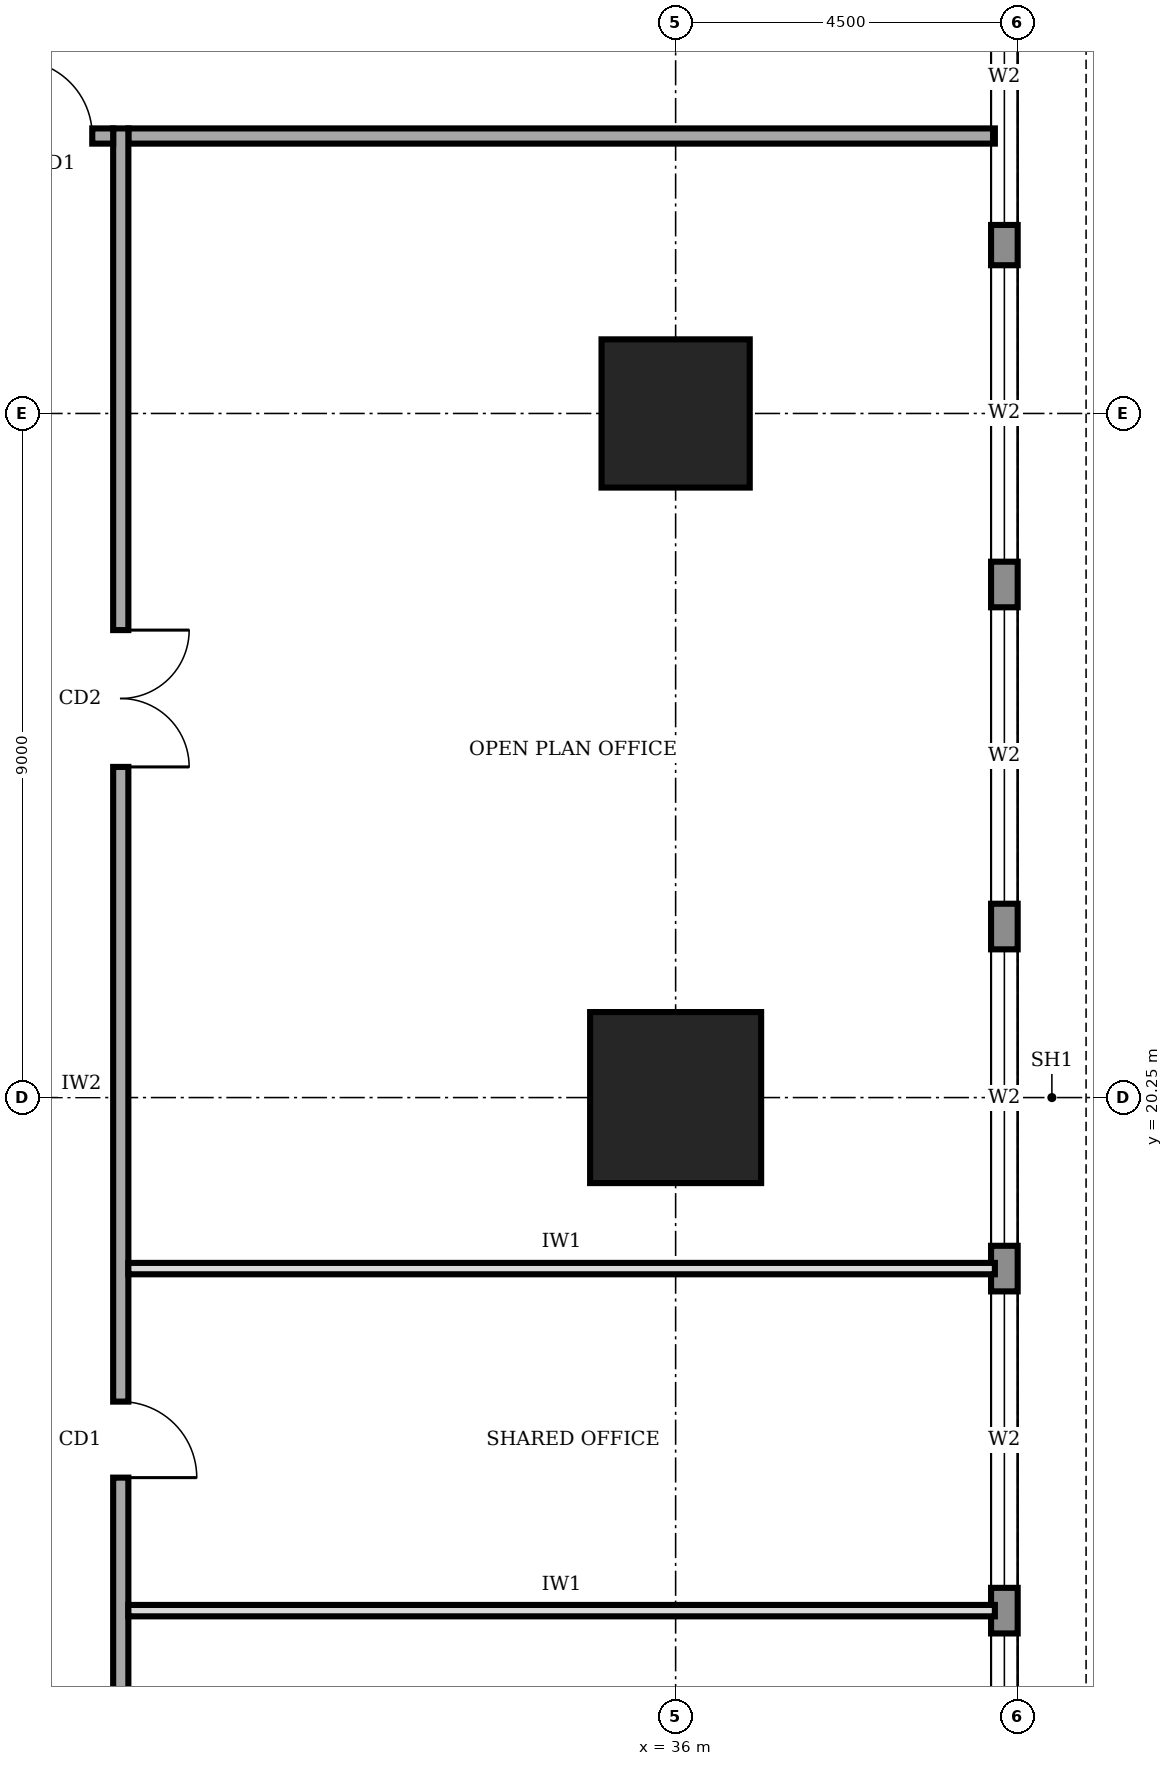
"""IFC4 building model, lengths in metres.
Left out: names, types, materials, properties, quantities, classifications, styles, units other than length and angle.
Written with IfcOpenShell. Run it as: python <this file> out.ifc"""

import sys

from ifc_helpers import new_model, si_unit, direction, frame, frame_2d, origin, origin_2d, place, context, subcontext, project, spatial, rectangle, extrude, element, fill, save


model = new_model("IFC4")
c1 = context("Model", 3, precision=1e-05, world=origin(), true_north=direction((0.0, 1.0)))
c2 = subcontext(c1, "Body", "Model", "MODEL_VIEW")
j1 = project(units=[si_unit("LENGTHUNIT", "METRE"), si_unit("PLANEANGLEUNIT", "RADIAN")], contexts=[c1])
p1 = place(None, origin())
s1 = spatial("IfcSite", under=j1, at=p1, CompositionType="ELEMENT")
p2 = place(p1, origin())
s2 = spatial("IfcBuilding", under=s1, at=p2, CompositionType="ELEMENT")
p3 = place(p2, frame((0.0, 0.0, 241.0)))
s3 = spatial("IfcBuildingStorey", under=s2, at=p3, CompositionType="ELEMENT", Elevation=241.0)
p4 = place(p3, frame((36.0, 20.25, 0.0), z_axis=(0.0, 0.0, 1.0), x_axis=(1.0, 0.0, 0.0)))
e1 = element("IfcColumn", 1, at=p4, inside=s3, PredefinedType="COLUMN", context=c2, shape_type="SweptSolid", body=[
    extrude(rectangle(XDim=2.25, YDim=2.25, at=origin_2d()), origin(), (0.0, 0.0, 1.0), 4.0),
])
p5 = place(p3, frame((36.0, 29.25, 0.0), z_axis=(0.0, 0.0, 1.0), x_axis=(1.0, 0.0, 0.0)))
e2 = element("IfcColumn", 2, at=p5, inside=s3, PredefinedType="COLUMN", context=c2, shape_type="SweptSolid", body=[
    extrude(rectangle(XDim=1.95, YDim=1.95, at=origin_2d()), origin(), (0.0, 0.0, 1.0), 4.0),
])
p6 = place(p3, frame((40.325, 4.52, 0.0), z_axis=(0.0, 0.0, 1.0), x_axis=(0.0, 1.0, 0.0)))
e3 = element("IfcWall", 3, at=p6, inside=s3, PredefinedType="STANDARD", context=c2, shape_type="SweptSolid", body=[
    extrude(rectangle(XDim=31.46, YDim=0.35, at=frame_2d((15.73, 0.0))), origin(), (0.0, 0.0, 1.0), 3.75),
])
p7 = place(p6, frame((4.78, 0.0, 0.6)))
e4 = element("IfcOpeningElement", 4, at=p7, cuts=e3, PredefinedType="OPENING", context=c2, shape_type="SweptSolid", body=[
    extrude(rectangle(XDim=3.9, YDim=2.6, at=frame_2d((1.95, 1.3))), frame((0.0, 0.185, 0.0), z_axis=(0.0, -1.0, 0.0), x_axis=(1.0, 0.0, 0.0)), (0.0, 0.0, 1.0), 0.37),
])
p8 = place(p6, frame((9.28, 0.0, 0.6)))
e5 = element("IfcOpeningElement", 5, at=p8, cuts=e3, PredefinedType="OPENING", context=c2, shape_type="SweptSolid", body=[
    extrude(rectangle(XDim=3.9, YDim=2.6, at=frame_2d((1.95, 1.3))), frame((0.0, 0.185, 0.0), z_axis=(0.0, -1.0, 0.0), x_axis=(1.0, 0.0, 0.0)), (0.0, 0.0, 1.0), 0.37),
])
p9 = place(p6, frame((13.78, 0.0, 0.6)))
e6 = element("IfcOpeningElement", 6, at=p9, cuts=e3, PredefinedType="OPENING", context=c2, shape_type="SweptSolid", body=[
    extrude(rectangle(XDim=3.9, YDim=2.6, at=frame_2d((1.95, 1.3))), frame((0.0, 0.185, 0.0), z_axis=(0.0, -1.0, 0.0), x_axis=(1.0, 0.0, 0.0)), (0.0, 0.0, 1.0), 0.37),
])
p10 = place(p6, frame((18.28, 0.0, 0.6)))
e7 = element("IfcOpeningElement", 7, at=p10, cuts=e3, PredefinedType="OPENING", context=c2, shape_type="SweptSolid", body=[
    extrude(rectangle(XDim=3.9, YDim=2.6, at=frame_2d((1.95, 1.3))), frame((0.0, 0.185, 0.0), z_axis=(0.0, -1.0, 0.0), x_axis=(1.0, 0.0, 0.0)), (0.0, 0.0, 1.0), 0.37),
])
p11 = place(p6, frame((22.78, 0.0, 0.6)))
e8 = element("IfcOpeningElement", 8, at=p11, cuts=e3, PredefinedType="OPENING", context=c2, shape_type="SweptSolid", body=[
    extrude(rectangle(XDim=3.9, YDim=2.6, at=frame_2d((1.95, 1.3))), frame((0.0, 0.185, 0.0), z_axis=(0.0, -1.0, 0.0), x_axis=(1.0, 0.0, 0.0)), (0.0, 0.0, 1.0), 0.37),
])
p12 = place(p6, frame((27.21, 0.0, 0.6)))
e9 = element("IfcOpeningElement", 9, at=p12, cuts=e3, PredefinedType="OPENING", context=c2, shape_type="SweptSolid", body=[
    extrude(rectangle(XDim=3.9, YDim=2.6, at=frame_2d((1.95, 1.3))), frame((0.0, 0.185, 0.0), z_axis=(0.0, -1.0, 0.0), x_axis=(1.0, 0.0, 0.0)), (0.0, 0.0, 1.0), 0.37),
])
p13 = place(p3, frame((28.7, 7.7, 0.0), z_axis=(0.0, 0.0, 1.0), x_axis=(0.0, 1.0, 0.0)))
e10 = element("IfcWall", 10, at=p13, inside=s3, PredefinedType="SOLIDWALL", context=c2, shape_type="SweptSolid", body=[
    extrude(rectangle(XDim=25.3, YDim=0.2, at=frame_2d((12.65, 0.0))), origin(), (0.0, 0.0, 1.0), 3.75),
])
p14 = place(p13, frame((2.3, 0.0, 0.0)))
e11 = element("IfcOpeningElement", 11, at=p14, cuts=e10, PredefinedType="OPENING", context=c2, shape_type="SweptSolid", body=[
    extrude(rectangle(XDim=1.0, YDim=2.1, at=frame_2d((0.5, 1.05))), frame((0.0, 0.11, 0.0), z_axis=(0.0, -1.0, 0.0), x_axis=(1.0, 0.0, 0.0)), (0.0, 0.0, 1.0), 0.22),
])
p15 = place(p13, frame((7.55, 0.0, 0.0)))
e12 = element("IfcOpeningElement", 12, at=p15, cuts=e10, PredefinedType="OPENING", context=c2, shape_type="SweptSolid", body=[
    extrude(rectangle(XDim=1.0, YDim=2.1, at=frame_2d((0.5, 1.05))), frame((0.0, 0.11, 0.0), z_axis=(0.0, -1.0, 0.0), x_axis=(1.0, 0.0, 0.0)), (0.0, 0.0, 1.0), 0.22),
])
p16 = place(p13, frame((16.9, 0.0, 0.0)))
e13 = element("IfcOpeningElement", 13, at=p16, cuts=e10, PredefinedType="OPENING", context=c2, shape_type="SweptSolid", body=[
    extrude(rectangle(XDim=1.8, YDim=2.1, at=frame_2d((0.9, 1.05))), frame((0.0, 0.11, 0.0), z_axis=(0.0, -1.0, 0.0), x_axis=(1.0, 0.0, 0.0)), (0.0, 0.0, 1.0), 0.22),
])
p17 = place(p3, frame((28.6, 32.9, 0.0), z_axis=(0.0, 0.0, 1.0), x_axis=(-1.0, 0.0, 0.0)))
e14 = element("IfcWall", 14, at=p17, inside=s3, PredefinedType="SOLIDWALL", context=c2, shape_type="SweptSolid", body=[
    extrude(rectangle(XDim=16.9, YDim=0.2, at=frame_2d((8.45, 0.0))), origin(), (0.0, 0.0, 1.0), 3.75),
])
p18 = place(p17, frame((15.425, 0.0, 0.0)))
e15 = element("IfcOpeningElement", 15, at=p18, cuts=e14, PredefinedType="OPENING", context=c2, shape_type="SweptSolid", body=[
    extrude(rectangle(XDim=1.0, YDim=2.1, at=frame_2d((0.5, 1.05))), frame((0.0, 0.11, 0.0), z_axis=(0.0, -1.0, 0.0), x_axis=(1.0, 0.0, 0.0)), (0.0, 0.0, 1.0), 0.22),
])
p19 = place(p17, frame((7.45, 0.0, 0.0)))
e16 = element("IfcOpeningElement", 16, at=p19, cuts=e14, PredefinedType="OPENING", context=c2, shape_type="SweptSolid", body=[
    extrude(rectangle(XDim=1.8, YDim=2.1, at=frame_2d((0.9, 1.05))), frame((0.0, 0.11, 0.0), z_axis=(0.0, -1.0, 0.0), x_axis=(1.0, 0.0, 0.0)), (0.0, 0.0, 1.0), 0.22),
])
p20 = place(p17, frame((0.275, 0.0, 0.0)))
e17 = element("IfcOpeningElement", 17, at=p20, cuts=e14, PredefinedType="OPENING", context=c2, shape_type="SweptSolid", body=[
    extrude(rectangle(XDim=1.0, YDim=2.1, at=frame_2d((0.5, 1.05))), frame((0.0, 0.11, 0.0), z_axis=(0.0, -1.0, 0.0), x_axis=(1.0, 0.0, 0.0)), (0.0, 0.0, 1.0), 0.22),
])
p21 = place(p3, frame((28.8, 32.9, 0.0), z_axis=(0.0, 0.0, 1.0), x_axis=(1.0, 0.0, 0.0)))
e18 = element("IfcWall", 18, at=p21, inside=s3, PredefinedType="SOLIDWALL", context=c2, shape_type="SweptSolid", body=[
    extrude(rectangle(XDim=11.4, YDim=0.2, at=frame_2d((5.7, 0.0))), origin(), (0.0, 0.0, 1.0), 3.75),
])
for number, where, z_axis, x_axis in (
    (19, (28.8, 13.5, 0.0), (0.0, 0.0, 1.0), (1.0, 0.0, 0.0)),
    (20, (28.8, 18.0, 0.0), (0.0, 0.0, 1.0), (1.0, 0.0, 0.0)),
):
    element("IfcWall", number, at=place(p3, frame(where, z_axis=z_axis, x_axis=x_axis)), inside=s3, PredefinedType="PARTITIONING", context=c2, shape_type="SweptSolid", body=[
        extrude(rectangle(XDim=11.4, YDim=0.15, at=frame_2d((5.7, 0.0))), origin(), (0.0, 0.0, 1.0), 3.75),
    ])
p22 = place(p7, origin())
e21 = element("IfcWindow", 21, at=p22, inside=s3, PartitioningType="SINGLE_PANEL", PredefinedType="WINDOW", context=c2, shape_type="SweptSolid", body=[
    extrude(rectangle(XDim=3.9, YDim=2.6, at=frame_2d((1.95, 1.3))), frame((0.0, 0.03, 0.0), z_axis=(0.0, -1.0, 0.0), x_axis=(1.0, 0.0, 0.0)), (0.0, 0.0, 1.0), 0.06),
])
fill(e4, e21)
p23 = place(p8, origin())
e22 = element("IfcWindow", 22, at=p23, inside=s3, PartitioningType="SINGLE_PANEL", PredefinedType="WINDOW", context=c2, shape_type="SweptSolid", body=[
    extrude(rectangle(XDim=3.9, YDim=2.6, at=frame_2d((1.95, 1.3))), frame((0.0, 0.03, 0.0), z_axis=(0.0, -1.0, 0.0), x_axis=(1.0, 0.0, 0.0)), (0.0, 0.0, 1.0), 0.06),
])
fill(e5, e22)
p24 = place(p9, origin())
e23 = element("IfcWindow", 23, at=p24, inside=s3, PartitioningType="SINGLE_PANEL", PredefinedType="WINDOW", context=c2, shape_type="SweptSolid", body=[
    extrude(rectangle(XDim=3.9, YDim=2.6, at=frame_2d((1.95, 1.3))), frame((0.0, 0.03, 0.0), z_axis=(0.0, -1.0, 0.0), x_axis=(1.0, 0.0, 0.0)), (0.0, 0.0, 1.0), 0.06),
])
fill(e6, e23)
p25 = place(p10, origin())
e24 = element("IfcWindow", 24, at=p25, inside=s3, PartitioningType="SINGLE_PANEL", PredefinedType="WINDOW", context=c2, shape_type="SweptSolid", body=[
    extrude(rectangle(XDim=3.9, YDim=2.6, at=frame_2d((1.95, 1.3))), frame((0.0, 0.03, 0.0), z_axis=(0.0, -1.0, 0.0), x_axis=(1.0, 0.0, 0.0)), (0.0, 0.0, 1.0), 0.06),
])
fill(e7, e24)
p26 = place(p11, origin())
e25 = element("IfcWindow", 25, at=p26, inside=s3, PartitioningType="SINGLE_PANEL", PredefinedType="WINDOW", context=c2, shape_type="SweptSolid", body=[
    extrude(rectangle(XDim=3.9, YDim=2.6, at=frame_2d((1.95, 1.3))), frame((0.0, 0.03, 0.0), z_axis=(0.0, -1.0, 0.0), x_axis=(1.0, 0.0, 0.0)), (0.0, 0.0, 1.0), 0.06),
])
fill(e8, e25)
p27 = place(p12, origin())
e26 = element("IfcWindow", 26, at=p27, inside=s3, PartitioningType="SINGLE_PANEL", PredefinedType="WINDOW", context=c2, shape_type="SweptSolid", body=[
    extrude(rectangle(XDim=3.9, YDim=2.6, at=frame_2d((1.95, 1.3))), frame((0.0, 0.03, 0.0), z_axis=(0.0, -1.0, 0.0), x_axis=(1.0, 0.0, 0.0)), (0.0, 0.0, 1.0), 0.06),
])
fill(e9, e26)
p28 = place(p15, frame((1.0, 0.0, 0.0), z_axis=(0.0, 0.0, 1.0), x_axis=(-1.0, 0.0, 0.0)))
e27 = element("IfcDoor", 27, at=p28, inside=s3, OperationType="SINGLE_SWING_RIGHT", PredefinedType="DOOR", context=c2, shape_type="SweptSolid", body=[
    extrude(rectangle(XDim=1.0, YDim=2.1, at=frame_2d((0.5, 1.05))), frame((0.0, 0.025, 0.0), z_axis=(0.0, -1.0, 0.0), x_axis=(1.0, 0.0, 0.0)), (0.0, 0.0, 1.0), 0.05),
])
fill(e12, e27)
p29 = place(p16, frame((1.8, 0.0, 0.0), z_axis=(0.0, 0.0, 1.0), x_axis=(-1.0, 0.0, 0.0)))
e28 = element("IfcDoor", 28, at=p29, inside=s3, OperationType="DOUBLE_DOOR_SINGLE_SWING", PredefinedType="DOOR", context=c2, shape_type="SweptSolid", body=[
    extrude(rectangle(XDim=1.8, YDim=2.1, at=frame_2d((0.9, 1.05))), frame((0.0, 0.025, 0.0), z_axis=(0.0, -1.0, 0.0), x_axis=(1.0, 0.0, 0.0)), (0.0, 0.0, 1.0), 0.05),
])
fill(e13, e28)
p30 = place(p20, frame((1.0, 0.0, 0.0), z_axis=(0.0, 0.0, 1.0), x_axis=(-1.0, 0.0, 0.0)))
e29 = element("IfcDoor", 29, at=p30, inside=s3, OperationType="SINGLE_SWING_LEFT", PredefinedType="DOOR", context=c2, shape_type="SweptSolid", body=[
    extrude(rectangle(XDim=1.0, YDim=2.1, at=frame_2d((0.5, 1.05))), frame((0.0, 0.025, 0.0), z_axis=(0.0, -1.0, 0.0), x_axis=(1.0, 0.0, 0.0)), (0.0, 0.0, 1.0), 0.05),
])
fill(e17, e29)
save(model, sys.argv[1])
